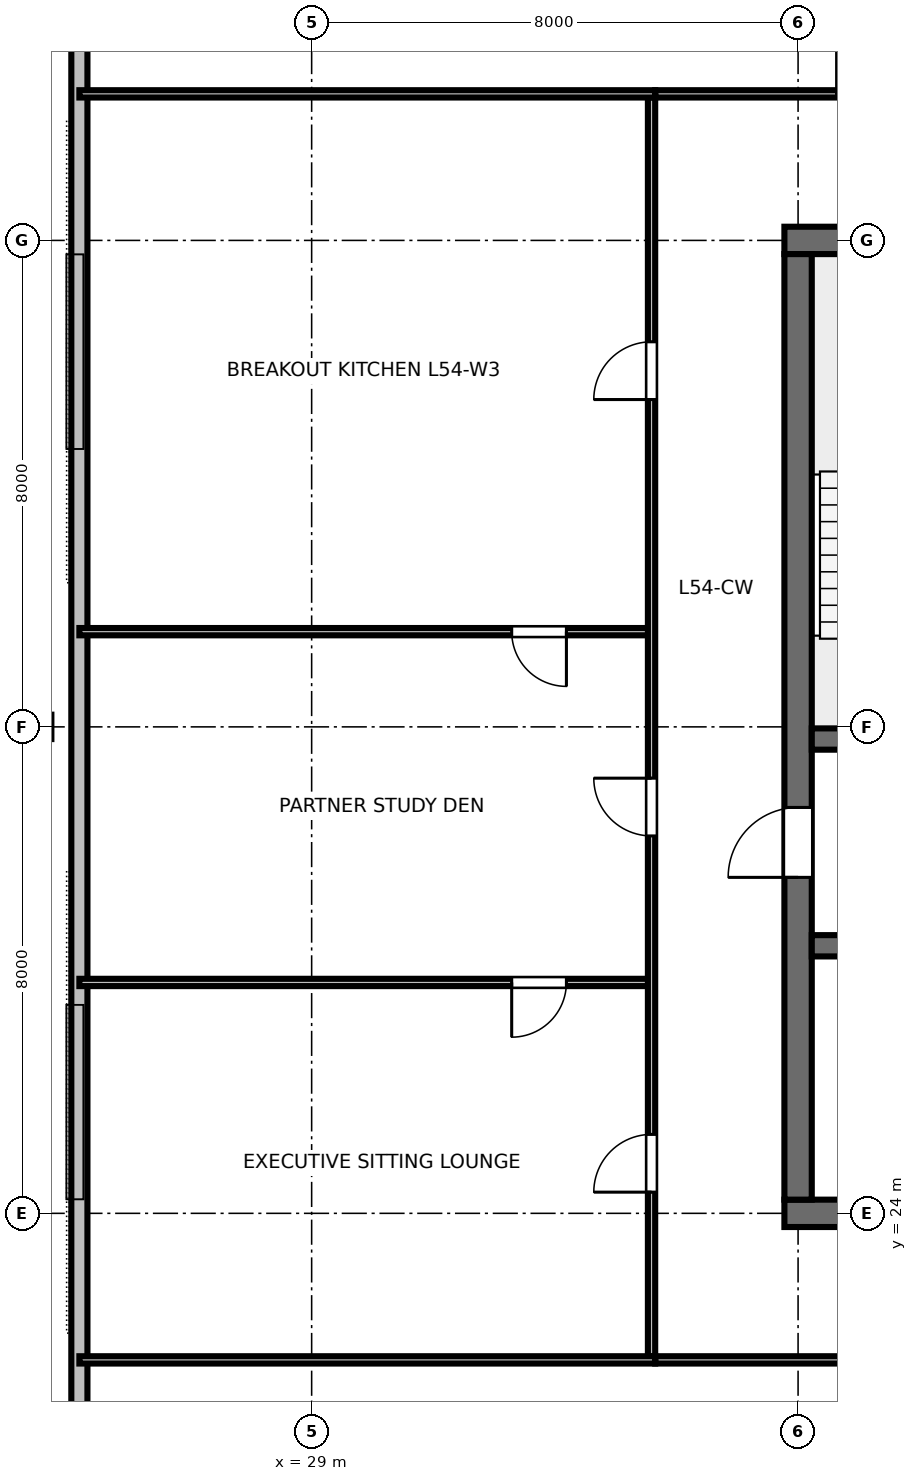
"""IFC4 building model, lengths in metres.
Left out: names, types, materials, properties, quantities, classifications, styles, units other than length and angle.
Written with IfcOpenShell. Run it as: python <this file> out.ifc"""

import sys

from ifc_helpers import new_model, si_unit, direction, frame, frame_2d, origin, origin_2d, place, context, subcontext, project, spatial, rectangle, i_section, extrude, element, fill, save


model = new_model("IFC4")
c1 = context("Model", 3, precision=1e-05, world=origin(), true_north=direction((0.0, 1.0)))
c2 = subcontext(c1, "Body", "Model", "MODEL_VIEW")
j1 = project(units=[si_unit("LENGTHUNIT", "METRE"), si_unit("PLANEANGLEUNIT", "RADIAN")], contexts=[c1])
p1 = place(None, origin())
s1 = spatial("IfcSite", under=j1, at=p1, CompositionType="ELEMENT")
p2 = place(p1, origin())
s2 = spatial("IfcBuilding", under=s1, at=p2, CompositionType="ELEMENT")
p3 = place(p2, frame((0.0, 0.0, 205.8)))
s3 = spatial("IfcBuildingStorey", under=s2, at=p3, CompositionType="ELEMENT", Elevation=205.8)
p4 = place(p3, frame((36.775, 24.0, 0.0), z_axis=(0.0, 0.0, 1.0), x_axis=(1.0, 0.0, 0.0)))
e1 = element("IfcWall", 1, at=p4, inside=s3, PredefinedType="SHEAR", context=c2, shape_type="SweptSolid", body=[
    extrude(rectangle(XDim=18.45, YDim=0.45, at=frame_2d((9.225, 0.0))), origin(), (0.0, 0.0, 1.0), 3.36),
])
p5 = place(p4, frame((13.425, 0.0, 0.0)))
e2 = element("IfcOpeningElement", 2, at=p5, cuts=e1, PredefinedType="OPENING", context=c2, shape_type="SweptSolid", body=[
    extrude(rectangle(XDim=1.6, YDim=2.15, at=frame_2d((0.8, 1.075))), frame((0.0, 0.235, 0.0), z_axis=(0.0, -1.0, 0.0), x_axis=(1.0, 0.0, 0.0)), (0.0, 0.0, 1.0), 0.47),
])
p6 = place(p3, frame((36.775, 40.0, 0.0), z_axis=(0.0, 0.0, 1.0), x_axis=(1.0, 0.0, 0.0)))
e3 = element("IfcWall", 3, at=p6, inside=s3, PredefinedType="SHEAR", context=c2, shape_type="SweptSolid", body=[
    extrude(rectangle(XDim=18.45, YDim=0.45, at=frame_2d((9.225, 0.0))), origin(), (0.0, 0.0, 1.0), 3.36),
])
p7 = place(p6, frame((8.725, 0.0, 0.0)))
e4 = element("IfcOpeningElement", 4, at=p7, cuts=e3, PredefinedType="OPENING", context=c2, shape_type="SweptSolid", body=[
    extrude(rectangle(XDim=1.0, YDim=2.15, at=frame_2d((0.5, 1.075))), frame((0.0, 0.235, 0.0), z_axis=(0.0, -1.0, 0.0), x_axis=(1.0, 0.0, 0.0)), (0.0, 0.0, 1.0), 0.47),
])
p8 = place(p3, frame((37.0, 24.225, 0.0), z_axis=(0.0, 0.0, 1.0), x_axis=(0.0, 1.0, 0.0)))
e5 = element("IfcWall", 5, at=p8, inside=s3, PredefinedType="SHEAR", context=c2, shape_type="SweptSolid", body=[
    extrude(rectangle(XDim=15.55, YDim=0.45, at=frame_2d((7.775, 0.0))), origin(), (0.0, 0.0, 1.0), 3.36),
])
p9 = place(p8, frame((5.3, 0.0, 0.0)))
e6 = element("IfcOpeningElement", 6, at=p9, cuts=e5, PredefinedType="OPENING", context=c2, shape_type="SweptSolid", body=[
    extrude(rectangle(XDim=1.15, YDim=2.15, at=frame_2d((0.575, 1.075))), frame((0.0, 0.235, 0.0), z_axis=(0.0, -1.0, 0.0), x_axis=(1.0, 0.0, 0.0)), (0.0, 0.0, 1.0), 0.47),
])
p10 = place(p3, frame((37.225, 31.8, 0.0), z_axis=(0.0, 0.0, 1.0), x_axis=(1.0, 0.0, 0.0)))
e7 = element("IfcWall", 7, at=p10, inside=s3, PredefinedType="SHEAR", context=c2, shape_type="SweptSolid", body=[
    extrude(rectangle(XDim=17.55, YDim=0.35, at=frame_2d((8.775, 0.0))), origin(), (0.0, 0.0, 1.0), 3.36),
])
p11 = place(p10, frame((0.825, 0.0, 0.0)))
e8 = element("IfcOpeningElement", 8, at=p11, cuts=e7, PredefinedType="OPENING", context=c2, shape_type="SweptSolid", body=[
    extrude(rectangle(XDim=1.1, YDim=2.15, at=frame_2d((0.55, 1.075))), frame((0.0, 0.185, 0.0), z_axis=(0.0, -1.0, 0.0), x_axis=(1.0, 0.0, 0.0)), (0.0, 0.0, 1.0), 0.37),
])
p12 = place(p10, frame((14.725, 0.0, 0.0)))
e9 = element("IfcOpeningElement", 9, at=p12, cuts=e7, PredefinedType="OPENING", context=c2, shape_type="SweptSolid", body=[
    extrude(rectangle(XDim=1.1, YDim=2.15, at=frame_2d((0.55, 1.075))), frame((0.0, 0.185, 0.0), z_axis=(0.0, -1.0, 0.0), x_axis=(1.0, 0.0, 0.0)), (0.0, 0.0, 1.0), 0.37),
])
p13 = place(p3, frame((37.225, 28.4, 0.0), z_axis=(0.0, 0.0, 1.0), x_axis=(1.0, 0.0, 0.0)))
e10 = element("IfcWall", 10, at=p13, inside=s3, PredefinedType="SHEAR", context=c2, shape_type="SweptSolid", body=[
    extrude(rectangle(XDim=17.55, YDim=0.35, at=frame_2d((8.775, 0.0))), origin(), (0.0, 0.0, 1.0), 3.36),
])
p14 = place(p3, frame((24.52, 32.0, 0.0), z_axis=(0.178954370443, 0.0, 0.98385737447), x_axis=(-0.98385737447, 0.0, 0.178954370443)))
e11 = element("IfcColumn", 11, at=p14, inside=s3, PredefinedType="COLUMN", context=c2, shape_type="SweptSolid", body=[
    extrude(i_section(OverallWidth=0.401, OverallDepth=0.399, WebThickness=0.025, FlangeThickness=0.04, FilletRadius=0.025, at=origin_2d()), origin(), (0.0, 0.0, 1.0), 3.428),
])
p15 = place(p3, frame((25.18, 45.24, 0.0), z_axis=(0.0, 0.0, 1.0), x_axis=(0.0, -1.0, 0.0)))
e12 = element("IfcWall", 12, at=p15, inside=s3, PredefinedType="STANDARD", context=c2, shape_type="SweptSolid", body=[
    extrude(rectangle(XDim=26.48, YDim=0.265, at=frame_2d((13.24, 0.0))), origin(), (0.0, 0.0, 1.0), 2.832),
])
p16 = place(p3, frame((34.65, 21.59, 0.0), z_axis=(0.0, 0.0, 1.0), x_axis=(1.0, 0.0, 0.0)))
e13 = element("IfcWall", 13, at=p16, inside=s3, PredefinedType="PARTITIONING", context=c2, shape_type="SweptSolid", body=[
    extrude(rectangle(XDim=10.33, YDim=0.12, at=frame_2d((5.165, 0.0))), origin(), (0.0, 0.0, 1.0), 2.655),
])
p17 = place(p16, frame((4.76, 0.0, 0.0)))
e14 = element("IfcOpeningElement", 14, at=p17, cuts=e13, PredefinedType="OPENING", context=c2, shape_type="SweptSolid", body=[
    extrude(rectangle(XDim=0.95, YDim=2.15, at=frame_2d((0.475, 1.075))), frame((0.0, 0.07, 0.0), z_axis=(0.0, -1.0, 0.0), x_axis=(1.0, 0.0, 0.0)), (0.0, 0.0, 1.0), 0.14),
])
p18 = place(p3, frame((34.65, 42.41, 0.0), z_axis=(0.0, 0.0, 1.0), x_axis=(1.0, 0.0, 0.0)))
e15 = element("IfcWall", 15, at=p18, inside=s3, PredefinedType="PARTITIONING", context=c2, shape_type="SweptSolid", body=[
    extrude(rectangle(XDim=10.33, YDim=0.12, at=frame_2d((5.165, 0.0))), origin(), (0.0, 0.0, 1.0), 2.655),
])
p19 = place(p18, frame((2.984, 0.0, 0.0)))
e16 = element("IfcOpeningElement", 16, at=p19, cuts=e15, PredefinedType="OPENING", context=c2, shape_type="SweptSolid", body=[
    extrude(rectangle(XDim=0.95, YDim=2.15, at=frame_2d((0.475, 1.075))), frame((0.0, 0.07, 0.0), z_axis=(0.0, -1.0, 0.0), x_axis=(1.0, 0.0, 0.0)), (0.0, 0.0, 1.0), 0.14),
])
p20 = place(p18, frame((8.079, 0.0, 0.0)))
e17 = element("IfcOpeningElement", 17, at=p20, cuts=e15, PredefinedType="OPENING", context=c2, shape_type="SweptSolid", body=[
    extrude(rectangle(XDim=0.95, YDim=2.15, at=frame_2d((0.475, 1.075))), frame((0.0, 0.07, 0.0), z_axis=(0.0, -1.0, 0.0), x_axis=(1.0, 0.0, 0.0)), (0.0, 0.0, 1.0), 0.14),
])
p21 = place(p3, frame((34.59, 27.797, 0.0), z_axis=(0.0, 0.0, 1.0), x_axis=(-1.0, 0.0, 0.0)))
e18 = element("IfcWall", 18, at=p21, inside=s3, PredefinedType="PARTITIONING", context=c2, shape_type="SweptSolid", body=[
    extrude(rectangle(XDim=9.41, YDim=0.12, at=frame_2d((4.705, 0.0))), origin(), (0.0, 0.0, 1.0), 2.655),
])
p22 = place(p21, frame((1.4, 0.0, 0.0)))
e19 = element("IfcOpeningElement", 19, at=p22, cuts=e18, PredefinedType="OPENING", context=c2, shape_type="SweptSolid", body=[
    extrude(rectangle(XDim=0.9, YDim=2.15, at=frame_2d((0.45, 1.075))), frame((0.0, 0.07, 0.0), z_axis=(0.0, -1.0, 0.0), x_axis=(1.0, 0.0, 0.0)), (0.0, 0.0, 1.0), 0.14),
])
p23 = place(p3, frame((34.59, 33.566, 0.0), z_axis=(0.0, 0.0, 1.0), x_axis=(-1.0, 0.0, 0.0)))
e20 = element("IfcWall", 20, at=p23, inside=s3, PredefinedType="PARTITIONING", context=c2, shape_type="SweptSolid", body=[
    extrude(rectangle(XDim=9.41, YDim=0.12, at=frame_2d((4.705, 0.0))), origin(), (0.0, 0.0, 1.0), 2.655),
])
p24 = place(p23, frame((1.4, 0.0, 0.0)))
e21 = element("IfcOpeningElement", 21, at=p24, cuts=e20, PredefinedType="OPENING", context=c2, shape_type="SweptSolid", body=[
    extrude(rectangle(XDim=0.9, YDim=2.15, at=frame_2d((0.45, 1.075))), frame((0.0, 0.07, 0.0), z_axis=(0.0, -1.0, 0.0), x_axis=(1.0, 0.0, 0.0)), (0.0, 0.0, 1.0), 0.14),
])
p25 = place(p3, frame((34.59, 21.65, 0.0), z_axis=(0.0, 0.0, 1.0), x_axis=(0.0, 1.0, 0.0)))
e22 = element("IfcWall", 22, at=p25, inside=s3, PredefinedType="PARTITIONING", context=c2, shape_type="SweptSolid", body=[
    extrude(rectangle(XDim=20.7, YDim=0.12, at=frame_2d((10.35, 0.0))), origin(), (0.0, 0.0, 1.0), 2.655),
])
p26 = place(p25, frame((2.698, 0.0, 0.0)))
e23 = element("IfcOpeningElement", 23, at=p26, cuts=e22, PredefinedType="OPENING", context=c2, shape_type="SweptSolid", body=[
    extrude(rectangle(XDim=0.95, YDim=2.15, at=frame_2d((0.475, 1.075))), frame((0.0, 0.07, 0.0), z_axis=(0.0, -1.0, 0.0), x_axis=(1.0, 0.0, 0.0)), (0.0, 0.0, 1.0), 0.14),
])
p27 = place(p25, frame((8.556, 0.0, 0.0)))
e24 = element("IfcOpeningElement", 24, at=p27, cuts=e22, PredefinedType="OPENING", context=c2, shape_type="SweptSolid", body=[
    extrude(rectangle(XDim=0.95, YDim=2.15, at=frame_2d((0.475, 1.075))), frame((0.0, 0.07, 0.0), z_axis=(0.0, -1.0, 0.0), x_axis=(1.0, 0.0, 0.0)), (0.0, 0.0, 1.0), 0.14),
])
p28 = place(p25, frame((15.733, 0.0, 0.0)))
e25 = element("IfcOpeningElement", 25, at=p28, cuts=e22, PredefinedType="OPENING", context=c2, shape_type="SweptSolid", body=[
    extrude(rectangle(XDim=0.95, YDim=2.15, at=frame_2d((0.475, 1.075))), frame((0.0, 0.07, 0.0), z_axis=(0.0, -1.0, 0.0), x_axis=(1.0, 0.0, 0.0)), (0.0, 0.0, 1.0), 0.14),
])
for number, where, z_axis, x_axis in (
    (26, (34.65, 21.59, 0.0), (0.0, 0.0, 1.0), (-1.0, 0.0, 0.0)),
    (27, (34.65, 42.41, 0.0), (0.0, 0.0, 1.0), (-1.0, 0.0, 0.0)),
):
    element("IfcWall", number, at=place(p3, frame(where, z_axis=z_axis, x_axis=x_axis)), inside=s3, PredefinedType="PARTITIONING", context=c2, shape_type="SweptSolid", body=[
        extrude(rectangle(XDim=9.47, YDim=0.12, at=frame_2d((4.735, 0.0))), origin(), (0.0, 0.0, 1.0), 2.655),
    ])
p29 = place(p9, origin())
e28 = element("IfcDoor", 28, at=p29, inside=s3, OperationType="SINGLE_SWING_LEFT", PredefinedType="DOOR", context=c2, shape_type="SweptSolid", body=[
    extrude(rectangle(XDim=1.15, YDim=2.15, at=frame_2d((0.575, 1.075))), frame((0.0, 0.025, 0.0), z_axis=(0.0, -1.0, 0.0), x_axis=(1.0, 0.0, 0.0)), (0.0, 0.0, 1.0), 0.05),
])
fill(e6, e28)
p30 = place(p19, origin())
e29 = element("IfcDoor", 29, at=p30, inside=s3, OperationType="SINGLE_SWING_LEFT", PredefinedType="DOOR", context=c2, shape_type="SweptSolid", body=[
    extrude(rectangle(XDim=0.95, YDim=2.15, at=frame_2d((0.475, 1.075))), frame((0.0, 0.025, 0.0), z_axis=(0.0, -1.0, 0.0), x_axis=(1.0, 0.0, 0.0)), (0.0, 0.0, 1.0), 0.05),
])
fill(e16, e29)
p31 = place(p22, origin())
e30 = element("IfcDoor", 30, at=p31, inside=s3, OperationType="SINGLE_SWING_RIGHT", PredefinedType="DOOR", context=c2, shape_type="SweptSolid", body=[
    extrude(rectangle(XDim=0.9, YDim=2.15, at=frame_2d((0.45, 1.075))), frame((0.0, 0.025, 0.0), z_axis=(0.0, -1.0, 0.0), x_axis=(1.0, 0.0, 0.0)), (0.0, 0.0, 1.0), 0.05),
])
fill(e19, e30)
p32 = place(p24, origin())
e31 = element("IfcDoor", 31, at=p32, inside=s3, OperationType="SINGLE_SWING_LEFT", PredefinedType="DOOR", context=c2, shape_type="SweptSolid", body=[
    extrude(rectangle(XDim=0.9, YDim=2.15, at=frame_2d((0.45, 1.075))), frame((0.0, 0.025, 0.0), z_axis=(0.0, -1.0, 0.0), x_axis=(1.0, 0.0, 0.0)), (0.0, 0.0, 1.0), 0.05),
])
fill(e21, e31)
p33 = place(p26, origin())
e32 = element("IfcDoor", 32, at=p33, inside=s3, OperationType="SINGLE_SWING_LEFT", PredefinedType="DOOR", context=c2, shape_type="SweptSolid", body=[
    extrude(rectangle(XDim=0.95, YDim=2.15, at=frame_2d((0.475, 1.075))), frame((0.0, 0.025, 0.0), z_axis=(0.0, -1.0, 0.0), x_axis=(1.0, 0.0, 0.0)), (0.0, 0.0, 1.0), 0.05),
])
fill(e23, e32)
p34 = place(p27, origin())
e33 = element("IfcDoor", 33, at=p34, inside=s3, OperationType="SINGLE_SWING_RIGHT", PredefinedType="DOOR", context=c2, shape_type="SweptSolid", body=[
    extrude(rectangle(XDim=0.95, YDim=2.15, at=frame_2d((0.475, 1.075))), frame((0.0, 0.025, 0.0), z_axis=(0.0, -1.0, 0.0), x_axis=(1.0, 0.0, 0.0)), (0.0, 0.0, 1.0), 0.05),
])
fill(e24, e33)
p35 = place(p28, origin())
e34 = element("IfcDoor", 34, at=p35, inside=s3, OperationType="SINGLE_SWING_LEFT", PredefinedType="DOOR", context=c2, shape_type="SweptSolid", body=[
    extrude(rectangle(XDim=0.95, YDim=2.15, at=frame_2d((0.475, 1.075))), frame((0.0, 0.025, 0.0), z_axis=(0.0, -1.0, 0.0), x_axis=(1.0, 0.0, 0.0)), (0.0, 0.0, 1.0), 0.05),
])
fill(e25, e34)
save(model, sys.argv[1])
